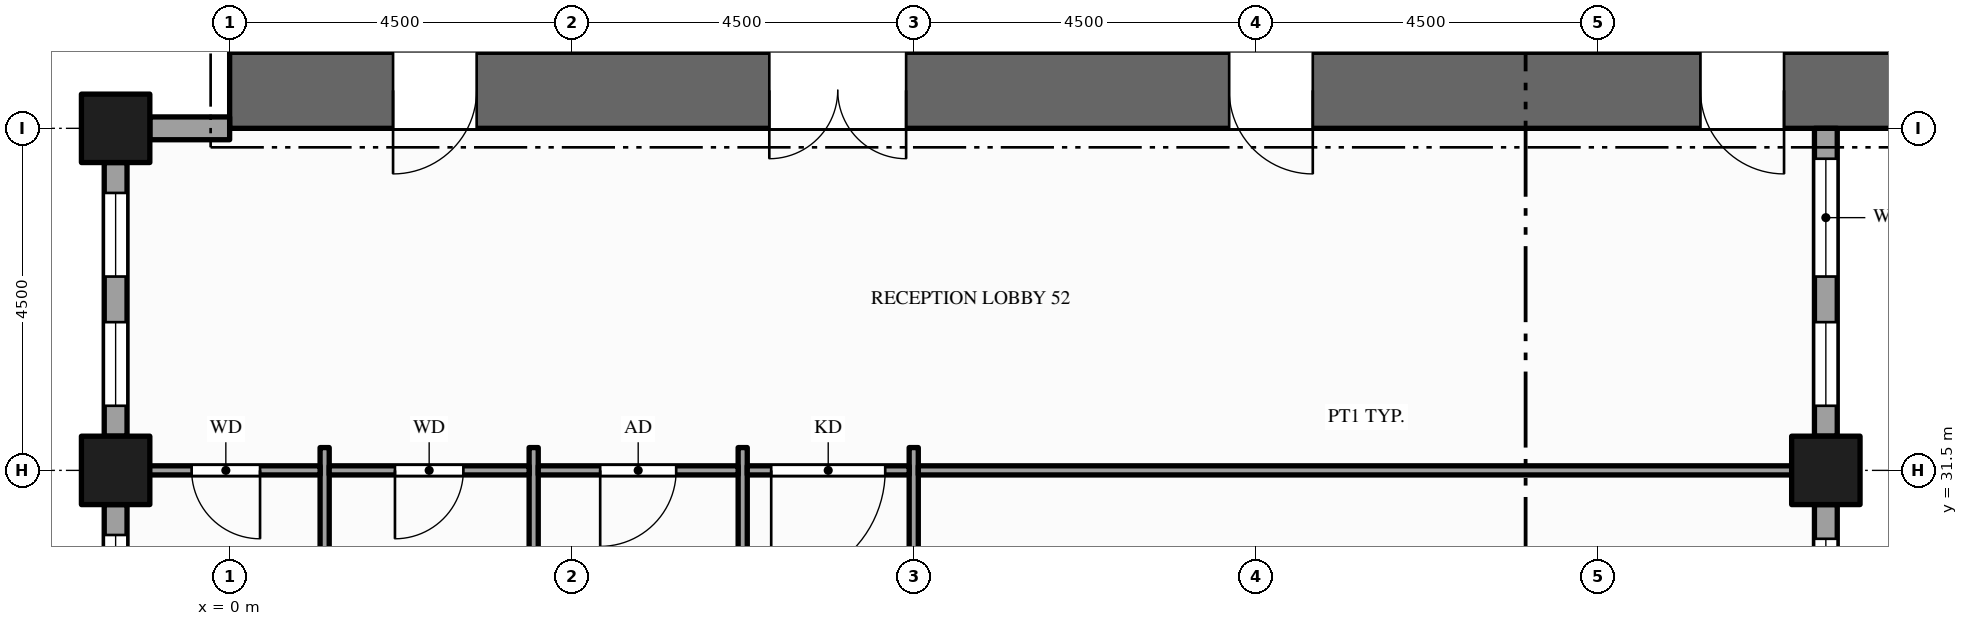
"""IFC4 building model, lengths in metres.
Left out: names, types, materials, properties, quantities, classifications, styles, units other than length and angle.
Written with IfcOpenShell. Run it as: python <this file> out.ifc"""

import sys

from ifc_helpers import new_model, si_unit, direction, frame, frame_2d, origin, origin_2d, place, context, subcontext, project, spatial, rectangle, hollow_rectangle, extrude, element, fill, save


model = new_model("IFC4")
c1 = context("Model", 3, precision=1e-05, world=origin(), true_north=direction((0.0, 1.0)))
c2 = subcontext(c1, "Body", "Model", "MODEL_VIEW")
j1 = project(units=[si_unit("LENGTHUNIT", "METRE"), si_unit("PLANEANGLEUNIT", "RADIAN")], contexts=[c1])
p1 = place(None, origin())
s1 = spatial("IfcSite", under=j1, at=p1, CompositionType="ELEMENT")
p2 = place(p1, origin())
s2 = spatial("IfcBuilding", under=s1, at=p2, CompositionType="ELEMENT")
p3 = place(p2, frame((0.0, 0.0, 171.0)))
s3 = spatial("IfcBuildingStorey", under=s2, at=p3, CompositionType="ELEMENT", Elevation=171.0)
p4 = place(p3, frame((0.0, 36.5, -0.15), z_axis=(0.0, 0.0, 1.0), x_axis=(1.0, 0.0, 0.0)))
e1 = element("IfcWall", 1, at=p4, inside=s3, PredefinedType="SHEAR", context=c2, shape_type="SweptSolid", body=[
    extrude(rectangle(XDim=22.5, YDim=1.0, at=frame_2d((11.25, 0.0))), origin(), (0.0, 0.0, 1.0), 4.0),
])
p5 = place(p4, frame((7.1, 0.0, 0.15)))
e2 = element("IfcOpeningElement", 2, at=p5, cuts=e1, PredefinedType="OPENING", context=c2, shape_type="SweptSolid", body=[
    extrude(rectangle(XDim=1.8, YDim=2.1, at=frame_2d((0.9, 1.05))), frame((0.0, 0.51, 0.0), z_axis=(0.0, -1.0, 0.0), x_axis=(1.0, 0.0, 0.0)), (0.0, 0.0, 1.0), 1.02),
])
p6 = place(p4, frame((13.15, 0.0, 0.15)))
e3 = element("IfcOpeningElement", 3, at=p6, cuts=e1, PredefinedType="OPENING", context=c2, shape_type="SweptSolid", body=[
    extrude(rectangle(XDim=1.1, YDim=2.1, at=frame_2d((0.55, 1.05))), frame((0.0, 0.51, 0.0), z_axis=(0.0, -1.0, 0.0), x_axis=(1.0, 0.0, 0.0)), (0.0, 0.0, 1.0), 1.02),
])
p7 = place(p4, frame((2.15, 0.0, 0.15)))
e4 = element("IfcOpeningElement", 4, at=p7, cuts=e1, PredefinedType="OPENING", context=c2, shape_type="SweptSolid", body=[
    extrude(rectangle(XDim=1.1, YDim=2.1, at=frame_2d((0.55, 1.05))), frame((0.0, 0.51, 0.0), z_axis=(0.0, -1.0, 0.0), x_axis=(1.0, 0.0, 0.0)), (0.0, 0.0, 1.0), 1.02),
])
p8 = place(p4, frame((19.35, 0.0, 0.15)))
e5 = element("IfcOpeningElement", 5, at=p8, cuts=e1, PredefinedType="OPENING", context=c2, shape_type="SweptSolid", body=[
    extrude(rectangle(XDim=1.1, YDim=2.1, at=frame_2d((0.55, 1.05))), frame((0.0, 0.51, 0.0), z_axis=(0.0, -1.0, 0.0), x_axis=(1.0, 0.0, 0.0)), (0.0, 0.0, 1.0), 1.02),
])
for number, where, z_axis, x_axis in (
    (6, (-1.5, 31.5, -0.15), (0.0, 0.0, 1.0), (1.0, 0.0, 0.0)),
    (7, (-1.5, 36.0, -0.15), (0.0, 0.0, 1.0), (1.0, 0.0, 0.0)),
    (8, (21.0, 31.5, -0.15), (0.0, 0.0, 1.0), (1.0, 0.0, 0.0)),
):
    element("IfcColumn", number, at=place(p3, frame(where, z_axis=z_axis, x_axis=x_axis)), inside=s3, PredefinedType="COLUMN", context=c2, shape_type="SweptSolid", body=[
        extrude(hollow_rectangle(XDim=0.9, YDim=0.9, WallThickness=0.045, at=origin_2d()), origin(), (0.0, 0.0, 1.0), 4.0),
    ])
p9 = place(p3, frame((21.0, 28.95, 0.0), z_axis=(0.0, 0.0, 1.0), x_axis=(0.0, 1.0, 0.0)))
e9 = element("IfcWall", 9, at=p9, inside=s3, PredefinedType="STANDARD", context=c2, shape_type="SweptSolid", body=[
    extrude(rectangle(XDim=2.1, YDim=0.3, at=frame_2d((1.05, 0.0))), origin(), (0.0, 0.0, 1.0), 3.149),
])
p10 = place(p9, frame((0.45, 0.0, 0.9)))
e10 = element("IfcOpeningElement", 10, at=p10, cuts=e9, PredefinedType="OPENING", context=c2, shape_type="SweptSolid", body=[
    extrude(rectangle(XDim=1.2, YDim=2.0, at=frame_2d((0.6, 1.0))), frame((0.0, 0.16, 0.0), z_axis=(0.0, -1.0, 0.0), x_axis=(1.0, 0.0, 0.0)), (0.0, 0.0, 1.0), 0.32),
])
p11 = place(p3, frame((21.0, 31.95, 0.0), z_axis=(0.0, 0.0, 1.0), x_axis=(0.0, 1.0, 0.0)))
e11 = element("IfcWall", 11, at=p11, inside=s3, PredefinedType="STANDARD", context=c2, shape_type="SweptSolid", body=[
    extrude(rectangle(XDim=4.05, YDim=0.3, at=frame_2d((2.025, 0.0))), origin(), (0.0, 0.0, 1.0), 3.149),
])
p12 = place(p11, frame((0.4, 0.0, 0.9)))
e12 = element("IfcOpeningElement", 12, at=p12, cuts=e11, PredefinedType="OPENING", context=c2, shape_type="SweptSolid", body=[
    extrude(rectangle(XDim=1.1, YDim=2.0, at=frame_2d((0.55, 1.0))), frame((0.0, 0.16, 0.0), z_axis=(0.0, -1.0, 0.0), x_axis=(1.0, 0.0, 0.0)), (0.0, 0.0, 1.0), 0.32),
])
p13 = place(p11, frame((2.1, 0.0, 0.9)))
e13 = element("IfcOpeningElement", 13, at=p13, cuts=e11, PredefinedType="OPENING", context=c2, shape_type="SweptSolid", body=[
    extrude(rectangle(XDim=1.55, YDim=2.0, at=frame_2d((0.775, 1.0))), frame((0.0, 0.16, 0.0), z_axis=(0.0, -1.0, 0.0), x_axis=(1.0, 0.0, 0.0)), (0.0, 0.0, 1.0), 0.32),
])
p14 = place(p3, frame((0.0, 36.0, 0.0), z_axis=(0.0, 0.0, 1.0), x_axis=(-1.0, 0.0, 0.0)))
e14 = element("IfcWall", 14, at=p14, inside=s3, PredefinedType="STANDARD", context=c2, shape_type="SweptSolid", body=[
    extrude(rectangle(XDim=1.05, YDim=0.3, at=frame_2d((0.525, 0.0))), origin(), (0.0, 0.0, 1.0), 2.87),
])
p15 = place(p3, frame((-1.5, 35.55, 0.0), z_axis=(0.0, 0.0, 1.0), x_axis=(0.0, -1.0, 0.0)))
e15 = element("IfcWall", 15, at=p15, inside=s3, PredefinedType="STANDARD", context=c2, shape_type="SweptSolid", body=[
    extrude(rectangle(XDim=3.6, YDim=0.3, at=frame_2d((1.8, 0.0))), origin(), (0.0, 0.0, 1.0), 3.149),
])
p16 = place(p15, frame((0.4, 0.0, 0.9)))
e16 = element("IfcOpeningElement", 16, at=p16, cuts=e15, PredefinedType="OPENING", context=c2, shape_type="SweptSolid", body=[
    extrude(rectangle(XDim=1.1, YDim=2.0, at=frame_2d((0.55, 1.0))), frame((0.0, 0.16, 0.0), z_axis=(0.0, -1.0, 0.0), x_axis=(1.0, 0.0, 0.0)), (0.0, 0.0, 1.0), 0.32),
])
p17 = place(p15, frame((2.1, 0.0, 0.9)))
e17 = element("IfcOpeningElement", 17, at=p17, cuts=e15, PredefinedType="OPENING", context=c2, shape_type="SweptSolid", body=[
    extrude(rectangle(XDim=1.1, YDim=2.0, at=frame_2d((0.55, 1.0))), frame((0.0, 0.16, 0.0), z_axis=(0.0, -1.0, 0.0), x_axis=(1.0, 0.0, 0.0)), (0.0, 0.0, 1.0), 0.32),
])
p18 = place(p3, frame((-1.5, 31.05, 0.0), z_axis=(0.0, 0.0, 1.0), x_axis=(0.0, -1.0, 0.0)))
e18 = element("IfcWall", 18, at=p18, inside=s3, PredefinedType="STANDARD", context=c2, shape_type="SweptSolid", body=[
    extrude(rectangle(XDim=3.6, YDim=0.3, at=frame_2d((1.8, 0.0))), origin(), (0.0, 0.0, 1.0), 3.149),
])
p19 = place(p18, frame((0.4, 0.0, 0.9)))
e19 = element("IfcOpeningElement", 19, at=p19, cuts=e18, PredefinedType="OPENING", context=c2, shape_type="SweptSolid", body=[
    extrude(rectangle(XDim=1.1, YDim=2.0, at=frame_2d((0.55, 1.0))), frame((0.0, 0.16, 0.0), z_axis=(0.0, -1.0, 0.0), x_axis=(1.0, 0.0, 0.0)), (0.0, 0.0, 1.0), 0.32),
])
p20 = place(p18, frame((2.1, 0.0, 0.9)))
e20 = element("IfcOpeningElement", 20, at=p20, cuts=e18, PredefinedType="OPENING", context=c2, shape_type="SweptSolid", body=[
    extrude(rectangle(XDim=1.1, YDim=2.0, at=frame_2d((0.55, 1.0))), frame((0.0, 0.16, 0.0), z_axis=(0.0, -1.0, 0.0), x_axis=(1.0, 0.0, 0.0)), (0.0, 0.0, 1.0), 0.32),
])
for number, where, z_axis, x_axis in (
    (21, (1.25, 26.7, 0.0), (0.0, 0.0, 1.0), (0.0, 1.0, 0.0)),
    (22, (4.0, 26.7, 0.0), (0.0, 0.0, 1.0), (0.0, 1.0, 0.0)),
):
    element("IfcWall", number, at=place(p3, frame(where, z_axis=z_axis, x_axis=x_axis)), inside=s3, PredefinedType="PARTITIONING", context=c2, shape_type="SweptSolid", body=[
        extrude(rectangle(XDim=5.1, YDim=0.12, at=frame_2d((2.55, 0.0))), origin(), (0.0, 0.0, 1.0), 3.85),
    ])
p21 = place(p3, frame((6.75, 13.2, 0.0), z_axis=(0.0, 0.0, 1.0), x_axis=(0.0, 1.0, 0.0)))
e23 = element("IfcWall", 23, at=p21, inside=s3, PredefinedType="PARTITIONING", context=c2, shape_type="SweptSolid", body=[
    extrude(rectangle(XDim=18.6, YDim=0.12, at=frame_2d((9.3, 0.0))), origin(), (0.0, 0.0, 1.0), 2.6),
])
p22 = place(p21, frame((3.175, 0.0, 0.0)))
e24 = element("IfcOpeningElement", 24, at=p22, cuts=e23, PredefinedType="OPENING", context=c2, shape_type="SweptSolid", body=[
    extrude(rectangle(XDim=1.0, YDim=2.1, at=frame_2d((0.5, 1.05))), frame((0.0, 0.07, 0.0), z_axis=(0.0, -1.0, 0.0), x_axis=(1.0, 0.0, 0.0)), (0.0, 0.0, 1.0), 0.14),
])
p23 = place(p21, frame((9.955, 0.0, 0.0)))
e25 = element("IfcOpeningElement", 25, at=p23, cuts=e23, PredefinedType="OPENING", context=c2, shape_type="SweptSolid", body=[
    extrude(rectangle(XDim=1.0, YDim=2.1, at=frame_2d((0.5, 1.05))), frame((0.0, 0.07, 0.0), z_axis=(0.0, -1.0, 0.0), x_axis=(1.0, 0.0, 0.0)), (0.0, 0.0, 1.0), 0.14),
])
p24 = place(p3, frame((9.0, 13.2, 0.0), z_axis=(0.0, 0.0, 1.0), x_axis=(0.0, 1.0, 0.0)))
e26 = element("IfcWall", 26, at=p24, inside=s3, PredefinedType="PARTITIONING", context=c2, shape_type="SweptSolid", body=[
    extrude(rectangle(XDim=18.6, YDim=0.12, at=frame_2d((9.3, 0.0))), origin(), (0.0, 0.0, 1.0), 2.6),
])
p25 = place(p24, frame((14.325, 0.0, 0.0)))
e27 = element("IfcOpeningElement", 27, at=p25, cuts=e26, PredefinedType="OPENING", context=c2, shape_type="SweptSolid", body=[
    extrude(rectangle(XDim=1.2, YDim=2.1, at=frame_2d((0.6, 1.05))), frame((0.0, 0.07, 0.0), z_axis=(0.0, -1.0, 0.0), x_axis=(1.0, 0.0, 0.0)), (0.0, 0.0, 1.0), 0.14),
])
p26 = place(p24, frame((4.2, 0.0, 0.0)))
e28 = element("IfcOpeningElement", 28, at=p26, cuts=e26, PredefinedType="OPENING", context=c2, shape_type="SweptSolid", body=[
    extrude(rectangle(XDim=1.2, YDim=2.1, at=frame_2d((0.6, 1.05))), frame((0.0, 0.07, 0.0), z_axis=(0.0, -1.0, 0.0), x_axis=(1.0, 0.0, 0.0)), (0.0, 0.0, 1.0), 0.14),
])
p27 = place(p3, frame((-1.35, 31.5, 0.0), z_axis=(0.0, 0.0, 1.0), x_axis=(1.0, 0.0, 0.0)))
e29 = element("IfcWall", 29, at=p27, inside=s3, PredefinedType="PARTITIONING", context=c2, shape_type="SweptSolid", body=[
    extrude(rectangle(XDim=2.54, YDim=0.12, at=frame_2d((1.27, 0.0))), origin(), (0.0, 0.0, 1.0), 2.87),
])
p28 = place(p27, frame((0.85, 0.0, 0.0)))
e30 = element("IfcOpeningElement", 30, at=p28, cuts=e29, PredefinedType="OPENING", context=c2, shape_type="SweptSolid", body=[
    extrude(rectangle(XDim=0.9, YDim=2.1, at=frame_2d((0.45, 1.05))), frame((0.0, 0.07, 0.0), z_axis=(0.0, -1.0, 0.0), x_axis=(1.0, 0.0, 0.0)), (0.0, 0.0, 1.0), 0.14),
])
p29 = place(p3, frame((1.31, 31.5, 0.0), z_axis=(0.0, 0.0, 1.0), x_axis=(1.0, 0.0, 0.0)))
e31 = element("IfcWall", 31, at=p29, inside=s3, PredefinedType="PARTITIONING", context=c2, shape_type="SweptSolid", body=[
    extrude(rectangle(XDim=2.63, YDim=0.12, at=frame_2d((1.315, 0.0))), origin(), (0.0, 0.0, 1.0), 2.87),
])
p30 = place(p29, frame((0.865, 0.0, 0.0)))
e32 = element("IfcOpeningElement", 32, at=p30, cuts=e31, PredefinedType="OPENING", context=c2, shape_type="SweptSolid", body=[
    extrude(rectangle(XDim=0.9, YDim=2.1, at=frame_2d((0.45, 1.05))), frame((0.0, 0.07, 0.0), z_axis=(0.0, -1.0, 0.0), x_axis=(1.0, 0.0, 0.0)), (0.0, 0.0, 1.0), 0.14),
])
p31 = place(p3, frame((4.06, 31.5, 0.0), z_axis=(0.0, 0.0, 1.0), x_axis=(1.0, 0.0, 0.0)))
e33 = element("IfcWall", 33, at=p31, inside=s3, PredefinedType="PARTITIONING", context=c2, shape_type="SweptSolid", body=[
    extrude(rectangle(XDim=2.63, YDim=0.12, at=frame_2d((1.315, 0.0))), origin(), (0.0, 0.0, 1.0), 2.87),
])
p32 = place(p31, frame((0.815, 0.0, 0.0)))
e34 = element("IfcOpeningElement", 34, at=p32, cuts=e33, PredefinedType="OPENING", context=c2, shape_type="SweptSolid", body=[
    extrude(rectangle(XDim=1.0, YDim=2.1, at=frame_2d((0.5, 1.05))), frame((0.0, 0.07, 0.0), z_axis=(0.0, -1.0, 0.0), x_axis=(1.0, 0.0, 0.0)), (0.0, 0.0, 1.0), 0.14),
])
p33 = place(p3, frame((6.81, 31.5, 0.0), z_axis=(0.0, 0.0, 1.0), x_axis=(1.0, 0.0, 0.0)))
e35 = element("IfcWall", 35, at=p33, inside=s3, PredefinedType="PARTITIONING", context=c2, shape_type="SweptSolid", body=[
    extrude(rectangle(XDim=2.13, YDim=0.12, at=frame_2d((1.065, 0.0))), origin(), (0.0, 0.0, 1.0), 2.87),
])
p34 = place(p33, frame((0.315, 0.0, 0.0)))
e36 = element("IfcOpeningElement", 36, at=p34, cuts=e35, PredefinedType="OPENING", context=c2, shape_type="SweptSolid", body=[
    extrude(rectangle(XDim=1.5, YDim=2.1, at=frame_2d((0.75, 1.05))), frame((0.0, 0.07, 0.0), z_axis=(0.0, -1.0, 0.0), x_axis=(1.0, 0.0, 0.0)), (0.0, 0.0, 1.0), 0.14),
])
p35 = place(p3, frame((9.06, 31.5, 0.0), z_axis=(0.0, 0.0, 1.0), x_axis=(1.0, 0.0, 0.0)))
e37 = element("IfcWall", 37, at=p35, inside=s3, PredefinedType="PARTITIONING", context=c2, shape_type="SweptSolid", body=[
    extrude(rectangle(XDim=11.79, YDim=0.12, at=frame_2d((5.895, 0.0))), origin(), (0.0, 0.0, 1.0), 2.87),
])
p36 = place(p10, origin())
e38 = element("IfcWindow", 38, at=p36, inside=s3, PartitioningType="SINGLE_PANEL", PredefinedType="WINDOW", context=c2, shape_type="SweptSolid", body=[
    extrude(rectangle(XDim=1.2, YDim=2.0, at=frame_2d((0.6, 1.0))), frame((0.0, 0.03, 0.0), z_axis=(0.0, -1.0, 0.0), x_axis=(1.0, 0.0, 0.0)), (0.0, 0.0, 1.0), 0.06),
])
fill(e10, e38)
p37 = place(p12, origin())
e39 = element("IfcWindow", 39, at=p37, inside=s3, PartitioningType="SINGLE_PANEL", PredefinedType="WINDOW", context=c2, shape_type="SweptSolid", body=[
    extrude(rectangle(XDim=1.1, YDim=2.0, at=frame_2d((0.55, 1.0))), frame((0.0, 0.03, 0.0), z_axis=(0.0, -1.0, 0.0), x_axis=(1.0, 0.0, 0.0)), (0.0, 0.0, 1.0), 0.06),
])
fill(e12, e39)
p38 = place(p13, origin())
e40 = element("IfcWindow", 40, at=p38, inside=s3, PartitioningType="SINGLE_PANEL", PredefinedType="WINDOW", context=c2, shape_type="SweptSolid", body=[
    extrude(rectangle(XDim=1.55, YDim=2.0, at=frame_2d((0.775, 1.0))), frame((0.0, 0.03, 0.0), z_axis=(0.0, -1.0, 0.0), x_axis=(1.0, 0.0, 0.0)), (0.0, 0.0, 1.0), 0.06),
])
fill(e13, e40)
p39 = place(p16, origin())
e41 = element("IfcWindow", 41, at=p39, inside=s3, PartitioningType="SINGLE_PANEL", PredefinedType="WINDOW", context=c2, shape_type="SweptSolid", body=[
    extrude(rectangle(XDim=1.1, YDim=2.0, at=frame_2d((0.55, 1.0))), frame((0.0, 0.03, 0.0), z_axis=(0.0, -1.0, 0.0), x_axis=(1.0, 0.0, 0.0)), (0.0, 0.0, 1.0), 0.06),
])
fill(e16, e41)
p40 = place(p17, origin())
e42 = element("IfcWindow", 42, at=p40, inside=s3, PartitioningType="SINGLE_PANEL", PredefinedType="WINDOW", context=c2, shape_type="SweptSolid", body=[
    extrude(rectangle(XDim=1.1, YDim=2.0, at=frame_2d((0.55, 1.0))), frame((0.0, 0.03, 0.0), z_axis=(0.0, -1.0, 0.0), x_axis=(1.0, 0.0, 0.0)), (0.0, 0.0, 1.0), 0.06),
])
fill(e17, e42)
p41 = place(p19, origin())
e43 = element("IfcWindow", 43, at=p41, inside=s3, PartitioningType="SINGLE_PANEL", PredefinedType="WINDOW", context=c2, shape_type="SweptSolid", body=[
    extrude(rectangle(XDim=1.1, YDim=2.0, at=frame_2d((0.55, 1.0))), frame((0.0, 0.03, 0.0), z_axis=(0.0, -1.0, 0.0), x_axis=(1.0, 0.0, 0.0)), (0.0, 0.0, 1.0), 0.06),
])
fill(e19, e43)
p42 = place(p5, origin())
e44 = element("IfcDoor", 44, at=p42, inside=s3, OperationType="DOUBLE_DOOR_SINGLE_SWING", PredefinedType="DOOR", context=c2, shape_type="SweptSolid", body=[
    extrude(rectangle(XDim=1.8, YDim=2.1, at=frame_2d((0.9, 1.05))), frame((0.0, 0.025, 0.0), z_axis=(0.0, -1.0, 0.0), x_axis=(1.0, 0.0, 0.0)), (0.0, 0.0, 1.0), 0.05),
])
fill(e2, e44)
p43 = place(p6, origin())
e45 = element("IfcDoor", 45, at=p43, inside=s3, OperationType="SINGLE_SWING_RIGHT", PredefinedType="DOOR", context=c2, shape_type="SweptSolid", body=[
    extrude(rectangle(XDim=1.1, YDim=2.1, at=frame_2d((0.55, 1.05))), frame((0.0, 0.025, 0.0), z_axis=(0.0, -1.0, 0.0), x_axis=(1.0, 0.0, 0.0)), (0.0, 0.0, 1.0), 0.05),
])
fill(e3, e45)
p44 = place(p7, origin())
e46 = element("IfcDoor", 46, at=p44, inside=s3, OperationType="SINGLE_SWING_LEFT", PredefinedType="DOOR", context=c2, shape_type="SweptSolid", body=[
    extrude(rectangle(XDim=1.1, YDim=2.1, at=frame_2d((0.55, 1.05))), frame((0.0, 0.025, 0.0), z_axis=(0.0, -1.0, 0.0), x_axis=(1.0, 0.0, 0.0)), (0.0, 0.0, 1.0), 0.05),
])
fill(e4, e46)
p45 = place(p8, origin())
e47 = element("IfcDoor", 47, at=p45, inside=s3, OperationType="SINGLE_SWING_RIGHT", PredefinedType="DOOR", context=c2, shape_type="SweptSolid", body=[
    extrude(rectangle(XDim=1.1, YDim=2.1, at=frame_2d((0.55, 1.05))), frame((0.0, 0.025, 0.0), z_axis=(0.0, -1.0, 0.0), x_axis=(1.0, 0.0, 0.0)), (0.0, 0.0, 1.0), 0.05),
])
fill(e5, e47)
p46 = place(p34, origin())
e48 = element("IfcDoor", 48, at=p46, inside=s3, OperationType="SINGLE_SWING_LEFT", PredefinedType="DOOR", context=c2, shape_type="SweptSolid", body=[
    extrude(rectangle(XDim=1.5, YDim=2.1, at=frame_2d((0.75, 1.05))), frame((0.0, 0.025, 0.0), z_axis=(0.0, -1.0, 0.0), x_axis=(1.0, 0.0, 0.0)), (0.0, 0.0, 1.0), 0.05),
])
fill(e36, e48)
p47 = place(p28, origin())
e49 = element("IfcDoor", 49, at=p47, inside=s3, OperationType="SINGLE_SWING_RIGHT", PredefinedType="DOOR", context=c2, shape_type="SweptSolid", body=[
    extrude(rectangle(XDim=0.9, YDim=2.1, at=frame_2d((0.45, 1.05))), frame((0.0, 0.025, 0.0), z_axis=(0.0, -1.0, 0.0), x_axis=(1.0, 0.0, 0.0)), (0.0, 0.0, 1.0), 0.05),
])
fill(e30, e49)
p48 = place(p30, origin())
e50 = element("IfcDoor", 50, at=p48, inside=s3, OperationType="SINGLE_SWING_LEFT", PredefinedType="DOOR", context=c2, shape_type="SweptSolid", body=[
    extrude(rectangle(XDim=0.9, YDim=2.1, at=frame_2d((0.45, 1.05))), frame((0.0, 0.025, 0.0), z_axis=(0.0, -1.0, 0.0), x_axis=(1.0, 0.0, 0.0)), (0.0, 0.0, 1.0), 0.05),
])
fill(e32, e50)
p49 = place(p32, origin())
e51 = element("IfcDoor", 51, at=p49, inside=s3, OperationType="SINGLE_SWING_LEFT", PredefinedType="DOOR", context=c2, shape_type="SweptSolid", body=[
    extrude(rectangle(XDim=1.0, YDim=2.1, at=frame_2d((0.5, 1.05))), frame((0.0, 0.025, 0.0), z_axis=(0.0, -1.0, 0.0), x_axis=(1.0, 0.0, 0.0)), (0.0, 0.0, 1.0), 0.05),
])
fill(e34, e51)
save(model, sys.argv[1])
